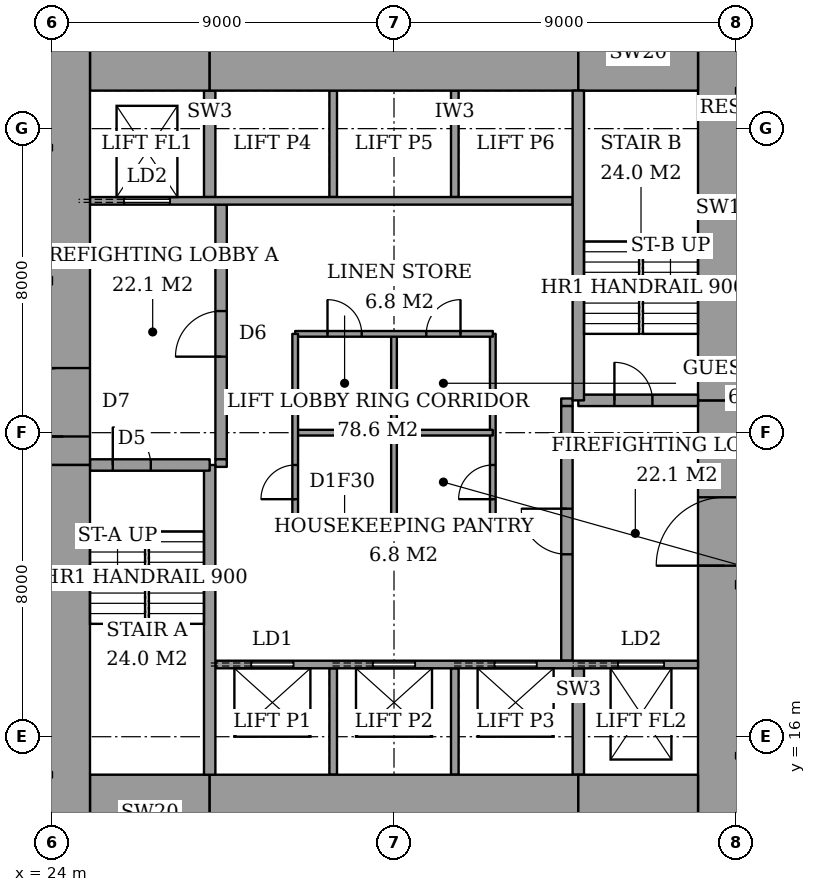
"""IFC4 building model, lengths in metres.
Left out: names, types, materials, properties, quantities, classifications, styles, units other than length and angle.
Written with IfcOpenShell. Run it as: python <this file> out.ifc"""

import sys

from ifc_helpers import new_model, si_unit, direction, frame, frame_2d, origin, place, context, subcontext, project, spatial, rectangle, extrude, element, fill, save


model = new_model("IFC4")
c1 = context("Model", 3, precision=1e-05, world=origin(), true_north=direction((0.0, 1.0)))
c2 = subcontext(c1, "Body", "Model", "MODEL_VIEW")
j1 = project(units=[si_unit("LENGTHUNIT", "METRE"), si_unit("PLANEANGLEUNIT", "RADIAN")], contexts=[c1])
p1 = place(None, origin())
s1 = spatial("IfcSite", under=j1, at=p1, CompositionType="ELEMENT")
p2 = place(p1, origin())
s2 = spatial("IfcBuilding", under=s1, at=p2, CompositionType="ELEMENT")
p3 = place(p2, frame((0.0, 0.0, 110.6)))
s3 = spatial("IfcBuildingStorey", under=s2, at=p3, CompositionType="ELEMENT", Elevation=110.6)
p4 = place(p3, frame((25.0, 14.0, 0.0), z_axis=(0.0, 0.0, 1.0), x_axis=(1.0, 0.0, 0.0)))
e1 = element("IfcWall", 1, at=p4, inside=s3, PredefinedType="SHEAR", context=c2, shape_type="SweptSolid", body=[
    extrude(rectangle(XDim=3.15, YDim=2.0, at=frame_2d((1.575, 0.0))), origin(), (0.0, 0.0, 1.0), 3.6),
])
p5 = place(p3, frame((28.15, 14.0, 0.0), z_axis=(0.0, 0.0, 1.0), x_axis=(1.0, 0.0, 0.0)))
e2 = element("IfcWall", 2, at=p5, inside=s3, PredefinedType="SHEAR", context=c2, shape_type="SweptSolid", body=[
    extrude(rectangle(XDim=9.7, YDim=2.0, at=frame_2d((4.85, 0.0))), origin(), (0.0, 0.0, 1.0), 3.6),
])
for number, where, z_axis, x_axis in (
    (3, (37.85, 14.0, 0.0), (0.0, 0.0, 1.0), (1.0, 0.0, 0.0)),
    (4, (25.0, 34.0, 0.0), (0.0, 0.0, 1.0), (1.0, 0.0, 0.0)),
):
    element("IfcWall", number, at=place(p3, frame(where, z_axis=z_axis, x_axis=x_axis)), inside=s3, PredefinedType="SHEAR", context=c2, shape_type="SweptSolid", body=[
        extrude(rectangle(XDim=3.15, YDim=2.0, at=frame_2d((1.575, 0.0))), origin(), (0.0, 0.0, 1.0), 3.6),
    ])
p6 = place(p3, frame((28.15, 34.0, 0.0), z_axis=(0.0, 0.0, 1.0), x_axis=(1.0, 0.0, 0.0)))
e5 = element("IfcWall", 5, at=p6, inside=s3, PredefinedType="SHEAR", context=c2, shape_type="SweptSolid", body=[
    extrude(rectangle(XDim=9.7, YDim=2.0, at=frame_2d((4.85, 0.0))), origin(), (0.0, 0.0, 1.0), 3.6),
])
p7 = place(p3, frame((37.85, 34.0, 0.0), z_axis=(0.0, 0.0, 1.0), x_axis=(1.0, 0.0, 0.0)))
e6 = element("IfcWall", 6, at=p7, inside=s3, PredefinedType="SHEAR", context=c2, shape_type="SweptSolid", body=[
    extrude(rectangle(XDim=3.15, YDim=2.0, at=frame_2d((1.575, 0.0))), origin(), (0.0, 0.0, 1.0), 3.6),
])
p8 = place(p3, frame((24.3, 13.0, 0.0), z_axis=(0.0, 0.0, 1.0), x_axis=(0.0, 1.0, 0.0)))
e7 = element("IfcWall", 7, at=p8, inside=s3, PredefinedType="SHEAR", context=c2, shape_type="SweptSolid", body=[
    extrude(rectangle(XDim=10.15, YDim=1.4, at=frame_2d((5.075, 0.0))), origin(), (0.0, 0.0, 1.0), 3.6),
])
p9 = place(p3, frame((24.3, 23.15, 0.0), z_axis=(0.0, 0.0, 1.0), x_axis=(0.0, 1.0, 0.0)))
e8 = element("IfcWall", 8, at=p9, inside=s3, PredefinedType="SHEAR", context=c2, shape_type="SweptSolid", body=[
    extrude(rectangle(XDim=11.85, YDim=1.4, at=frame_2d((5.925, 0.0))), origin(), (0.0, 0.0, 1.0), 3.6),
])
p10 = place(p9, frame((0.75, 0.0, 0.0)))
e9 = element("IfcOpeningElement", 9, at=p10, cuts=e8, PredefinedType="OPENING", context=c2, shape_type="SweptSolid", body=[
    extrude(rectangle(XDim=1.8, YDim=2.4, at=frame_2d((0.9, 1.2))), frame((0.0, 0.71, 0.0), z_axis=(0.0, -1.0, 0.0), x_axis=(1.0, 0.0, 0.0)), (0.0, 0.0, 1.0), 1.42),
])
p11 = place(p3, frame((41.7, 13.0, 0.0), z_axis=(0.0, 0.0, 1.0), x_axis=(0.0, 1.0, 0.0)))
e10 = element("IfcWall", 10, at=p11, inside=s3, PredefinedType="SHEAR", context=c2, shape_type="SweptSolid", body=[
    extrude(rectangle(XDim=11.85, YDim=1.4, at=frame_2d((5.925, 0.0))), origin(), (0.0, 0.0, 1.0), 3.6),
])
p12 = place(p11, frame((7.5, 0.0, 0.0)))
e11 = element("IfcOpeningElement", 11, at=p12, cuts=e10, PredefinedType="OPENING", context=c2, shape_type="SweptSolid", body=[
    extrude(rectangle(XDim=1.8, YDim=2.4, at=frame_2d((0.9, 1.2))), frame((0.0, 0.71, 0.0), z_axis=(0.0, -1.0, 0.0), x_axis=(1.0, 0.0, 0.0)), (0.0, 0.0, 1.0), 1.42),
])
p13 = place(p3, frame((41.7, 24.85, 0.0), z_axis=(0.0, 0.0, 1.0), x_axis=(0.0, 1.0, 0.0)))
e12 = element("IfcWall", 12, at=p13, inside=s3, PredefinedType="SHEAR", context=c2, shape_type="SweptSolid", body=[
    extrude(rectangle(XDim=10.15, YDim=1.4, at=frame_2d((5.075, 0.0))), origin(), (0.0, 0.0, 1.0), 3.6),
])
p14 = place(p3, frame((28.15, 15.0, 0.0), z_axis=(0.0, 0.0, 1.0), x_axis=(0.0, 1.0, 0.0)))
e13 = element("IfcWall", 13, at=p14, inside=s3, PredefinedType="SHEAR", context=c2, shape_type="SweptSolid", body=[
    extrude(rectangle(XDim=8.15, YDim=0.3, at=frame_2d((4.075, 0.0))), origin(), (0.0, 0.0, 1.0), 3.6),
])
p15 = place(p3, frame((25.0, 23.15, 0.0), z_axis=(0.0, 0.0, 1.0), x_axis=(1.0, 0.0, 0.0)))
e14 = element("IfcWall", 14, at=p15, inside=s3, PredefinedType="SHEAR", context=c2, shape_type="SweptSolid", body=[
    extrude(rectangle(XDim=3.15, YDim=0.3, at=frame_2d((1.575, 0.0))), origin(), (0.0, 0.0, 1.0), 3.6),
])
p16 = place(p15, frame((0.6, 0.0, 0.0)))
e15 = element("IfcOpeningElement", 15, at=p16, cuts=e14, PredefinedType="OPENING", context=c2, shape_type="SweptSolid", body=[
    extrude(rectangle(XDim=1.0, YDim=2.1, at=frame_2d((0.5, 1.05))), frame((0.0, 0.16, 0.0), z_axis=(0.0, -1.0, 0.0), x_axis=(1.0, 0.0, 0.0)), (0.0, 0.0, 1.0), 0.32),
])
p17 = place(p3, frame((37.85, 24.85, 0.0), z_axis=(0.0, 0.0, 1.0), x_axis=(0.0, 1.0, 0.0)))
e16 = element("IfcWall", 16, at=p17, inside=s3, PredefinedType="SHEAR", context=c2, shape_type="SweptSolid", body=[
    extrude(rectangle(XDim=8.15, YDim=0.3, at=frame_2d((4.075, 0.0))), origin(), (0.0, 0.0, 1.0), 3.6),
])
p18 = place(p3, frame((37.85, 24.85, 0.0), z_axis=(0.0, 0.0, 1.0), x_axis=(1.0, 0.0, 0.0)))
e17 = element("IfcWall", 17, at=p18, inside=s3, PredefinedType="SHEAR", context=c2, shape_type="SweptSolid", body=[
    extrude(rectangle(XDim=3.15, YDim=0.3, at=frame_2d((1.575, 0.0))), origin(), (0.0, 0.0, 1.0), 3.6),
])
p19 = place(p18, frame((0.95, 0.0, 0.0)))
e18 = element("IfcOpeningElement", 18, at=p19, cuts=e17, PredefinedType="OPENING", context=c2, shape_type="SweptSolid", body=[
    extrude(rectangle(XDim=1.0, YDim=2.1, at=frame_2d((0.5, 1.05))), frame((0.0, 0.16, 0.0), z_axis=(0.0, -1.0, 0.0), x_axis=(1.0, 0.0, 0.0)), (0.0, 0.0, 1.0), 0.32),
])
p20 = place(p3, frame((28.45, 23.3, 0.0), z_axis=(0.0, 0.0, 1.0), x_axis=(0.0, 1.0, 0.0)))
e19 = element("IfcWall", 19, at=p20, inside=s3, PredefinedType="PARTITIONING", context=c2, shape_type="SweptSolid", body=[
    extrude(rectangle(XDim=6.7, YDim=0.3, at=frame_2d((3.35, 0.0))), origin(), (0.0, 0.0, 1.0), 3.6),
])
p21 = place(p20, frame((2.7, 0.0, 0.0)))
e20 = element("IfcOpeningElement", 20, at=p21, cuts=e19, PredefinedType="OPENING", context=c2, shape_type="SweptSolid", body=[
    extrude(rectangle(XDim=1.2, YDim=2.1, at=frame_2d((0.6, 1.05))), frame((0.0, 0.16, 0.0), z_axis=(0.0, -1.0, 0.0), x_axis=(1.0, 0.0, 0.0)), (0.0, 0.0, 1.0), 0.32),
])
p22 = place(p3, frame((37.55, 18.0, 0.0), z_axis=(0.0, 0.0, 1.0), x_axis=(0.0, 1.0, 0.0)))
e21 = element("IfcWall", 21, at=p22, inside=s3, PredefinedType="PARTITIONING", context=c2, shape_type="SweptSolid", body=[
    extrude(rectangle(XDim=6.7, YDim=0.3, at=frame_2d((3.35, 0.0))), origin(), (0.0, 0.0, 1.0), 3.6),
])
p23 = place(p22, frame((2.8, 0.0, 0.0)))
e22 = element("IfcOpeningElement", 22, at=p23, cuts=e21, PredefinedType="OPENING", context=c2, shape_type="SweptSolid", body=[
    extrude(rectangle(XDim=1.2, YDim=2.1, at=frame_2d((0.6, 1.05))), frame((0.0, 0.16, 0.0), z_axis=(0.0, -1.0, 0.0), x_axis=(1.0, 0.0, 0.0)), (0.0, 0.0, 1.0), 0.32),
])
p24 = place(p3, frame((28.3, 17.9, 0.0), z_axis=(0.0, 0.0, 1.0), x_axis=(1.0, 0.0, 0.0)))
e23 = element("IfcWall", 23, at=p24, inside=s3, PredefinedType="PARTITIONING", context=c2, shape_type="SweptSolid", body=[
    extrude(rectangle(XDim=12.7, YDim=0.2, at=frame_2d((6.35, 0.0))), origin(), (0.0, 0.0, 1.0), 3.6),
])
p25 = place(p24, frame((0.95, 0.0, 0.0)))
e24 = element("IfcOpeningElement", 24, at=p25, cuts=e23, PredefinedType="OPENING", context=c2, shape_type="SweptSolid", body=[
    extrude(rectangle(XDim=1.1, YDim=2.1, at=frame_2d((0.55, 1.05))), frame((0.0, 0.11, 0.0), z_axis=(0.0, -1.0, 0.0), x_axis=(1.0, 0.0, 0.0)), (0.0, 0.0, 1.0), 0.22),
])
p26 = place(p24, frame((4.15, 0.0, 0.0)))
e25 = element("IfcOpeningElement", 25, at=p26, cuts=e23, PredefinedType="OPENING", context=c2, shape_type="SweptSolid", body=[
    extrude(rectangle(XDim=1.1, YDim=2.1, at=frame_2d((0.55, 1.05))), frame((0.0, 0.11, 0.0), z_axis=(0.0, -1.0, 0.0), x_axis=(1.0, 0.0, 0.0)), (0.0, 0.0, 1.0), 0.22),
])
p27 = place(p24, frame((7.35, 0.0, 0.0)))
e26 = element("IfcOpeningElement", 26, at=p27, cuts=e23, PredefinedType="OPENING", context=c2, shape_type="SweptSolid", body=[
    extrude(rectangle(XDim=1.1, YDim=2.1, at=frame_2d((0.55, 1.05))), frame((0.0, 0.11, 0.0), z_axis=(0.0, -1.0, 0.0), x_axis=(1.0, 0.0, 0.0)), (0.0, 0.0, 1.0), 0.22),
])
p28 = place(p24, frame((10.6, 0.0, 0.0)))
e27 = element("IfcOpeningElement", 27, at=p28, cuts=e23, PredefinedType="OPENING", context=c2, shape_type="SweptSolid", body=[
    extrude(rectangle(XDim=1.2, YDim=2.1, at=frame_2d((0.6, 1.05))), frame((0.0, 0.11, 0.0), z_axis=(0.0, -1.0, 0.0), x_axis=(1.0, 0.0, 0.0)), (0.0, 0.0, 1.0), 0.22),
])
p29 = place(p3, frame((25.0, 30.1, 0.0), z_axis=(0.0, 0.0, 1.0), x_axis=(1.0, 0.0, 0.0)))
e28 = element("IfcWall", 28, at=p29, inside=s3, PredefinedType="PARTITIONING", context=c2, shape_type="SweptSolid", body=[
    extrude(rectangle(XDim=12.7, YDim=0.2, at=frame_2d((6.35, 0.0))), origin(), (0.0, 0.0, 1.0), 3.6),
])
p30 = place(p29, frame((0.9, 0.0, 0.0)))
e29 = element("IfcOpeningElement", 29, at=p30, cuts=e28, PredefinedType="OPENING", context=c2, shape_type="SweptSolid", body=[
    extrude(rectangle(XDim=1.2, YDim=2.1, at=frame_2d((0.6, 1.05))), frame((0.0, 0.11, 0.0), z_axis=(0.0, -1.0, 0.0), x_axis=(1.0, 0.0, 0.0)), (0.0, 0.0, 1.0), 0.22),
])
for number, where, z_axis, x_axis in (
    (30, (31.4, 15.0, 0.0), (0.0, 0.0, 1.0), (0.0, 1.0, 0.0)),
    (31, (34.6, 15.0, 0.0), (0.0, 0.0, 1.0), (0.0, 1.0, 0.0)),
):
    element("IfcWall", number, at=place(p3, frame(where, z_axis=z_axis, x_axis=x_axis)), inside=s3, PredefinedType="PARTITIONING", context=c2, shape_type="SweptSolid", body=[
        extrude(rectangle(XDim=2.8, YDim=0.2, at=frame_2d((1.4, 0.0))), origin(), (0.0, 0.0, 1.0), 3.6),
    ])
p31 = place(p3, frame((37.85, 15.0, 0.0), z_axis=(0.0, 0.0, 1.0), x_axis=(0.0, 1.0, 0.0)))
e32 = element("IfcWall", 32, at=p31, inside=s3, PredefinedType="SHEAR", context=c2, shape_type="SweptSolid", body=[
    extrude(rectangle(XDim=2.8, YDim=0.3, at=frame_2d((1.4, 0.0))), origin(), (0.0, 0.0, 1.0), 3.6),
])
for number, where, z_axis, x_axis in (
    (33, (31.4, 30.2, 0.0), (0.0, 0.0, 1.0), (0.0, 1.0, 0.0)),
    (34, (34.6, 30.2, 0.0), (0.0, 0.0, 1.0), (0.0, 1.0, 0.0)),
):
    element("IfcWall", number, at=place(p3, frame(where, z_axis=z_axis, x_axis=x_axis)), inside=s3, PredefinedType="PARTITIONING", context=c2, shape_type="SweptSolid", body=[
        extrude(rectangle(XDim=2.8, YDim=0.2, at=frame_2d((1.4, 0.0))), origin(), (0.0, 0.0, 1.0), 3.6),
    ])
p32 = place(p3, frame((28.15, 30.2, 0.0), z_axis=(0.0, 0.0, 1.0), x_axis=(0.0, 1.0, 0.0)))
e35 = element("IfcWall", 35, at=p32, inside=s3, PredefinedType="SHEAR", context=c2, shape_type="SweptSolid", body=[
    extrude(rectangle(XDim=2.8, YDim=0.3, at=frame_2d((1.4, 0.0))), origin(), (0.0, 0.0, 1.0), 3.6),
])
for number, where, z_axis, x_axis in (
    (36, (28.3, 23.2, 0.0), (0.0, 0.0, 1.0), (1.0, 0.0, 0.0)),
    (37, (37.4, 24.8, 0.0), (0.0, 0.0, 1.0), (1.0, 0.0, 0.0)),
):
    element("IfcWall", number, at=place(p3, frame(where, z_axis=z_axis, x_axis=x_axis)), inside=s3, PredefinedType="PARTITIONING", context=c2, shape_type="SweptSolid", body=[
        extrude(rectangle(XDim=0.3, YDim=0.2, at=frame_2d((0.15, 0.0))), origin(), (0.0, 0.0, 1.0), 3.6),
    ])
p33 = place(p3, frame((30.4, 21.4, 0.0), z_axis=(0.0, 0.0, 1.0), x_axis=(1.0, 0.0, 0.0)))
e38 = element("IfcWall", 38, at=p33, inside=s3, PredefinedType="PARTITIONING", context=c2, shape_type="SweptSolid", body=[
    extrude(rectangle(XDim=5.2, YDim=0.15, at=frame_2d((2.6, 0.0))), origin(), (0.0, 0.0, 1.0), 3.35),
])
p34 = place(p3, frame((30.4, 26.6, 0.0), z_axis=(0.0, 0.0, 1.0), x_axis=(1.0, 0.0, 0.0)))
e39 = element("IfcWall", 39, at=p34, inside=s3, PredefinedType="PARTITIONING", context=c2, shape_type="SweptSolid", body=[
    extrude(rectangle(XDim=5.2, YDim=0.15, at=frame_2d((2.6, 0.0))), origin(), (0.0, 0.0, 1.0), 3.35),
])
p35 = place(p34, frame((0.85, 0.0, 0.0)))
e40 = element("IfcOpeningElement", 40, at=p35, cuts=e39, PredefinedType="OPENING", context=c2, shape_type="SweptSolid", body=[
    extrude(rectangle(XDim=0.9, YDim=2.1, at=frame_2d((0.45, 1.05))), frame((0.0, 0.085, 0.0), z_axis=(0.0, -1.0, 0.0), x_axis=(1.0, 0.0, 0.0)), (0.0, 0.0, 1.0), 0.17),
])
p36 = place(p34, frame((3.45, 0.0, 0.0)))
e41 = element("IfcOpeningElement", 41, at=p36, cuts=e39, PredefinedType="OPENING", context=c2, shape_type="SweptSolid", body=[
    extrude(rectangle(XDim=0.9, YDim=2.1, at=frame_2d((0.45, 1.05))), frame((0.0, 0.085, 0.0), z_axis=(0.0, -1.0, 0.0), x_axis=(1.0, 0.0, 0.0)), (0.0, 0.0, 1.0), 0.17),
])
p37 = place(p3, frame((30.4, 21.4, 0.0), z_axis=(0.0, 0.0, 1.0), x_axis=(0.0, 1.0, 0.0)))
e42 = element("IfcWall", 42, at=p37, inside=s3, PredefinedType="PARTITIONING", context=c2, shape_type="SweptSolid", body=[
    extrude(rectangle(XDim=5.2, YDim=0.15, at=frame_2d((2.6, 0.0))), origin(), (0.0, 0.0, 1.0), 3.35),
])
p38 = place(p37, frame((0.85, 0.0, 0.0)))
e43 = element("IfcOpeningElement", 43, at=p38, cuts=e42, PredefinedType="OPENING", context=c2, shape_type="SweptSolid", body=[
    extrude(rectangle(XDim=0.9, YDim=2.1, at=frame_2d((0.45, 1.05))), frame((0.0, 0.085, 0.0), z_axis=(0.0, -1.0, 0.0), x_axis=(1.0, 0.0, 0.0)), (0.0, 0.0, 1.0), 0.17),
])
p39 = place(p3, frame((35.6, 21.4, 0.0), z_axis=(0.0, 0.0, 1.0), x_axis=(0.0, 1.0, 0.0)))
e44 = element("IfcWall", 44, at=p39, inside=s3, PredefinedType="PARTITIONING", context=c2, shape_type="SweptSolid", body=[
    extrude(rectangle(XDim=5.2, YDim=0.15, at=frame_2d((2.6, 0.0))), origin(), (0.0, 0.0, 1.0), 3.35),
])
p40 = place(p39, frame((0.85, 0.0, 0.0)))
e45 = element("IfcOpeningElement", 45, at=p40, cuts=e44, PredefinedType="OPENING", context=c2, shape_type="SweptSolid", body=[
    extrude(rectangle(XDim=0.9, YDim=2.1, at=frame_2d((0.45, 1.05))), frame((0.0, 0.085, 0.0), z_axis=(0.0, -1.0, 0.0), x_axis=(1.0, 0.0, 0.0)), (0.0, 0.0, 1.0), 0.17),
])
for number, where, z_axis, x_axis in (
    (46, (30.4, 24.0, 0.0), (0.0, 0.0, 1.0), (1.0, 0.0, 0.0)),
    (47, (33.0, 21.4, 0.0), (0.0, 0.0, 1.0), (0.0, 1.0, 0.0)),
):
    element("IfcWall", number, at=place(p3, frame(where, z_axis=z_axis, x_axis=x_axis)), inside=s3, PredefinedType="PARTITIONING", context=c2, shape_type="SweptSolid", body=[
        extrude(rectangle(XDim=5.2, YDim=0.15, at=frame_2d((2.6, 0.0))), origin(), (0.0, 0.0, 1.0), 3.35),
    ])
p41 = place(p16, origin())
e48 = element("IfcDoor", 48, at=p41, inside=s3, OperationType="SINGLE_SWING_RIGHT", PredefinedType="DOOR", context=c2, shape_type="SweptSolid", body=[
    extrude(rectangle(XDim=1.0, YDim=2.1, at=frame_2d((0.5, 1.05))), frame((0.0, 0.025, 0.0), z_axis=(0.0, -1.0, 0.0), x_axis=(1.0, 0.0, 0.0)), (0.0, 0.0, 1.0), 0.05),
])
fill(e15, e48)
p42 = place(p19, origin())
e49 = element("IfcDoor", 49, at=p42, inside=s3, OperationType="SINGLE_SWING_RIGHT", PredefinedType="DOOR", context=c2, shape_type="SweptSolid", body=[
    extrude(rectangle(XDim=1.0, YDim=2.1, at=frame_2d((0.5, 1.05))), frame((0.0, 0.025, 0.0), z_axis=(0.0, -1.0, 0.0), x_axis=(1.0, 0.0, 0.0)), (0.0, 0.0, 1.0), 0.05),
])
fill(e18, e49)
p43 = place(p21, origin())
e50 = element("IfcDoor", 50, at=p43, inside=s3, OperationType="SINGLE_SWING_RIGHT", PredefinedType="DOOR", context=c2, shape_type="SweptSolid", body=[
    extrude(rectangle(XDim=1.2, YDim=2.1, at=frame_2d((0.6, 1.05))), frame((0.0, 0.025, 0.0), z_axis=(0.0, -1.0, 0.0), x_axis=(1.0, 0.0, 0.0)), (0.0, 0.0, 1.0), 0.05),
])
fill(e20, e50)
p44 = place(p23, origin())
e51 = element("IfcDoor", 51, at=p44, inside=s3, OperationType="SINGLE_SWING_LEFT", PredefinedType="DOOR", context=c2, shape_type="SweptSolid", body=[
    extrude(rectangle(XDim=1.2, YDim=2.1, at=frame_2d((0.6, 1.05))), frame((0.0, 0.025, 0.0), z_axis=(0.0, -1.0, 0.0), x_axis=(1.0, 0.0, 0.0)), (0.0, 0.0, 1.0), 0.05),
])
fill(e22, e51)
p45 = place(p10, origin())
e52 = element("IfcDoor", 52, at=p45, inside=s3, OperationType="DOUBLE_DOOR_DOUBLE_SWING", PredefinedType="DOOR", context=c2, shape_type="SweptSolid", body=[
    extrude(rectangle(XDim=1.8, YDim=2.4, at=frame_2d((0.9, 1.2))), frame((0.0, 0.025, 0.0), z_axis=(0.0, -1.0, 0.0), x_axis=(1.0, 0.0, 0.0)), (0.0, 0.0, 1.0), 0.05),
])
fill(e9, e52)
p46 = place(p12, origin())
e53 = element("IfcDoor", 53, at=p46, inside=s3, OperationType="DOUBLE_DOOR_DOUBLE_SWING", PredefinedType="DOOR", context=c2, shape_type="SweptSolid", body=[
    extrude(rectangle(XDim=1.8, YDim=2.4, at=frame_2d((0.9, 1.2))), frame((0.0, 0.025, 0.0), z_axis=(0.0, -1.0, 0.0), x_axis=(1.0, 0.0, 0.0)), (0.0, 0.0, 1.0), 0.05),
])
fill(e11, e53)
p47 = place(p38, origin())
e54 = element("IfcDoor", 54, at=p47, inside=s3, OperationType="SINGLE_SWING_RIGHT", PredefinedType="DOOR", context=c2, shape_type="SweptSolid", body=[
    extrude(rectangle(XDim=0.9, YDim=2.1, at=frame_2d((0.45, 1.05))), frame((0.0, 0.025, 0.0), z_axis=(0.0, -1.0, 0.0), x_axis=(1.0, 0.0, 0.0)), (0.0, 0.0, 1.0), 0.05),
])
fill(e43, e54)
p48 = place(p40, origin())
e55 = element("IfcDoor", 55, at=p48, inside=s3, OperationType="SINGLE_SWING_RIGHT", PredefinedType="DOOR", context=c2, shape_type="SweptSolid", body=[
    extrude(rectangle(XDim=0.9, YDim=2.1, at=frame_2d((0.45, 1.05))), frame((0.0, 0.025, 0.0), z_axis=(0.0, -1.0, 0.0), x_axis=(1.0, 0.0, 0.0)), (0.0, 0.0, 1.0), 0.05),
])
fill(e45, e55)
p49 = place(p35, origin())
e56 = element("IfcDoor", 56, at=p49, inside=s3, OperationType="SINGLE_SWING_RIGHT", PredefinedType="DOOR", context=c2, shape_type="SweptSolid", body=[
    extrude(rectangle(XDim=0.9, YDim=2.1, at=frame_2d((0.45, 1.05))), frame((0.0, 0.025, 0.0), z_axis=(0.0, -1.0, 0.0), x_axis=(1.0, 0.0, 0.0)), (0.0, 0.0, 1.0), 0.05),
])
fill(e40, e56)
p50 = place(p36, origin())
e57 = element("IfcDoor", 57, at=p50, inside=s3, OperationType="SINGLE_SWING_LEFT", PredefinedType="DOOR", context=c2, shape_type="SweptSolid", body=[
    extrude(rectangle(XDim=0.9, YDim=2.1, at=frame_2d((0.45, 1.05))), frame((0.0, 0.025, 0.0), z_axis=(0.0, -1.0, 0.0), x_axis=(1.0, 0.0, 0.0)), (0.0, 0.0, 1.0), 0.05),
])
fill(e41, e57)
p51 = place(p25, origin())
e58 = element("IfcDoor", 58, at=p51, inside=s3, OperationType="SLIDING_TO_LEFT", PredefinedType="DOOR", context=c2, shape_type="SweptSolid", body=[
    extrude(rectangle(XDim=1.1, YDim=2.1, at=frame_2d((0.55, 1.05))), frame((0.0, 0.025, 0.0), z_axis=(0.0, -1.0, 0.0), x_axis=(1.0, 0.0, 0.0)), (0.0, 0.0, 1.0), 0.05),
])
fill(e24, e58)
p52 = place(p26, origin())
e59 = element("IfcDoor", 59, at=p52, inside=s3, OperationType="SLIDING_TO_LEFT", PredefinedType="DOOR", context=c2, shape_type="SweptSolid", body=[
    extrude(rectangle(XDim=1.1, YDim=2.1, at=frame_2d((0.55, 1.05))), frame((0.0, 0.025, 0.0), z_axis=(0.0, -1.0, 0.0), x_axis=(1.0, 0.0, 0.0)), (0.0, 0.0, 1.0), 0.05),
])
fill(e25, e59)
p53 = place(p27, origin())
e60 = element("IfcDoor", 60, at=p53, inside=s3, OperationType="SLIDING_TO_LEFT", PredefinedType="DOOR", context=c2, shape_type="SweptSolid", body=[
    extrude(rectangle(XDim=1.1, YDim=2.1, at=frame_2d((0.55, 1.05))), frame((0.0, 0.025, 0.0), z_axis=(0.0, -1.0, 0.0), x_axis=(1.0, 0.0, 0.0)), (0.0, 0.0, 1.0), 0.05),
])
fill(e26, e60)
p54 = place(p30, origin())
e61 = element("IfcDoor", 61, at=p54, inside=s3, OperationType="SLIDING_TO_LEFT", PredefinedType="DOOR", context=c2, shape_type="SweptSolid", body=[
    extrude(rectangle(XDim=1.2, YDim=2.1, at=frame_2d((0.6, 1.05))), frame((0.0, 0.025, 0.0), z_axis=(0.0, -1.0, 0.0), x_axis=(1.0, 0.0, 0.0)), (0.0, 0.0, 1.0), 0.05),
])
fill(e29, e61)
p55 = place(p28, origin())
e62 = element("IfcDoor", 62, at=p55, inside=s3, OperationType="SLIDING_TO_LEFT", PredefinedType="DOOR", context=c2, shape_type="SweptSolid", body=[
    extrude(rectangle(XDim=1.2, YDim=2.1, at=frame_2d((0.6, 1.05))), frame((0.0, 0.025, 0.0), z_axis=(0.0, -1.0, 0.0), x_axis=(1.0, 0.0, 0.0)), (0.0, 0.0, 1.0), 0.05),
])
fill(e27, e62)
save(model, sys.argv[1])
